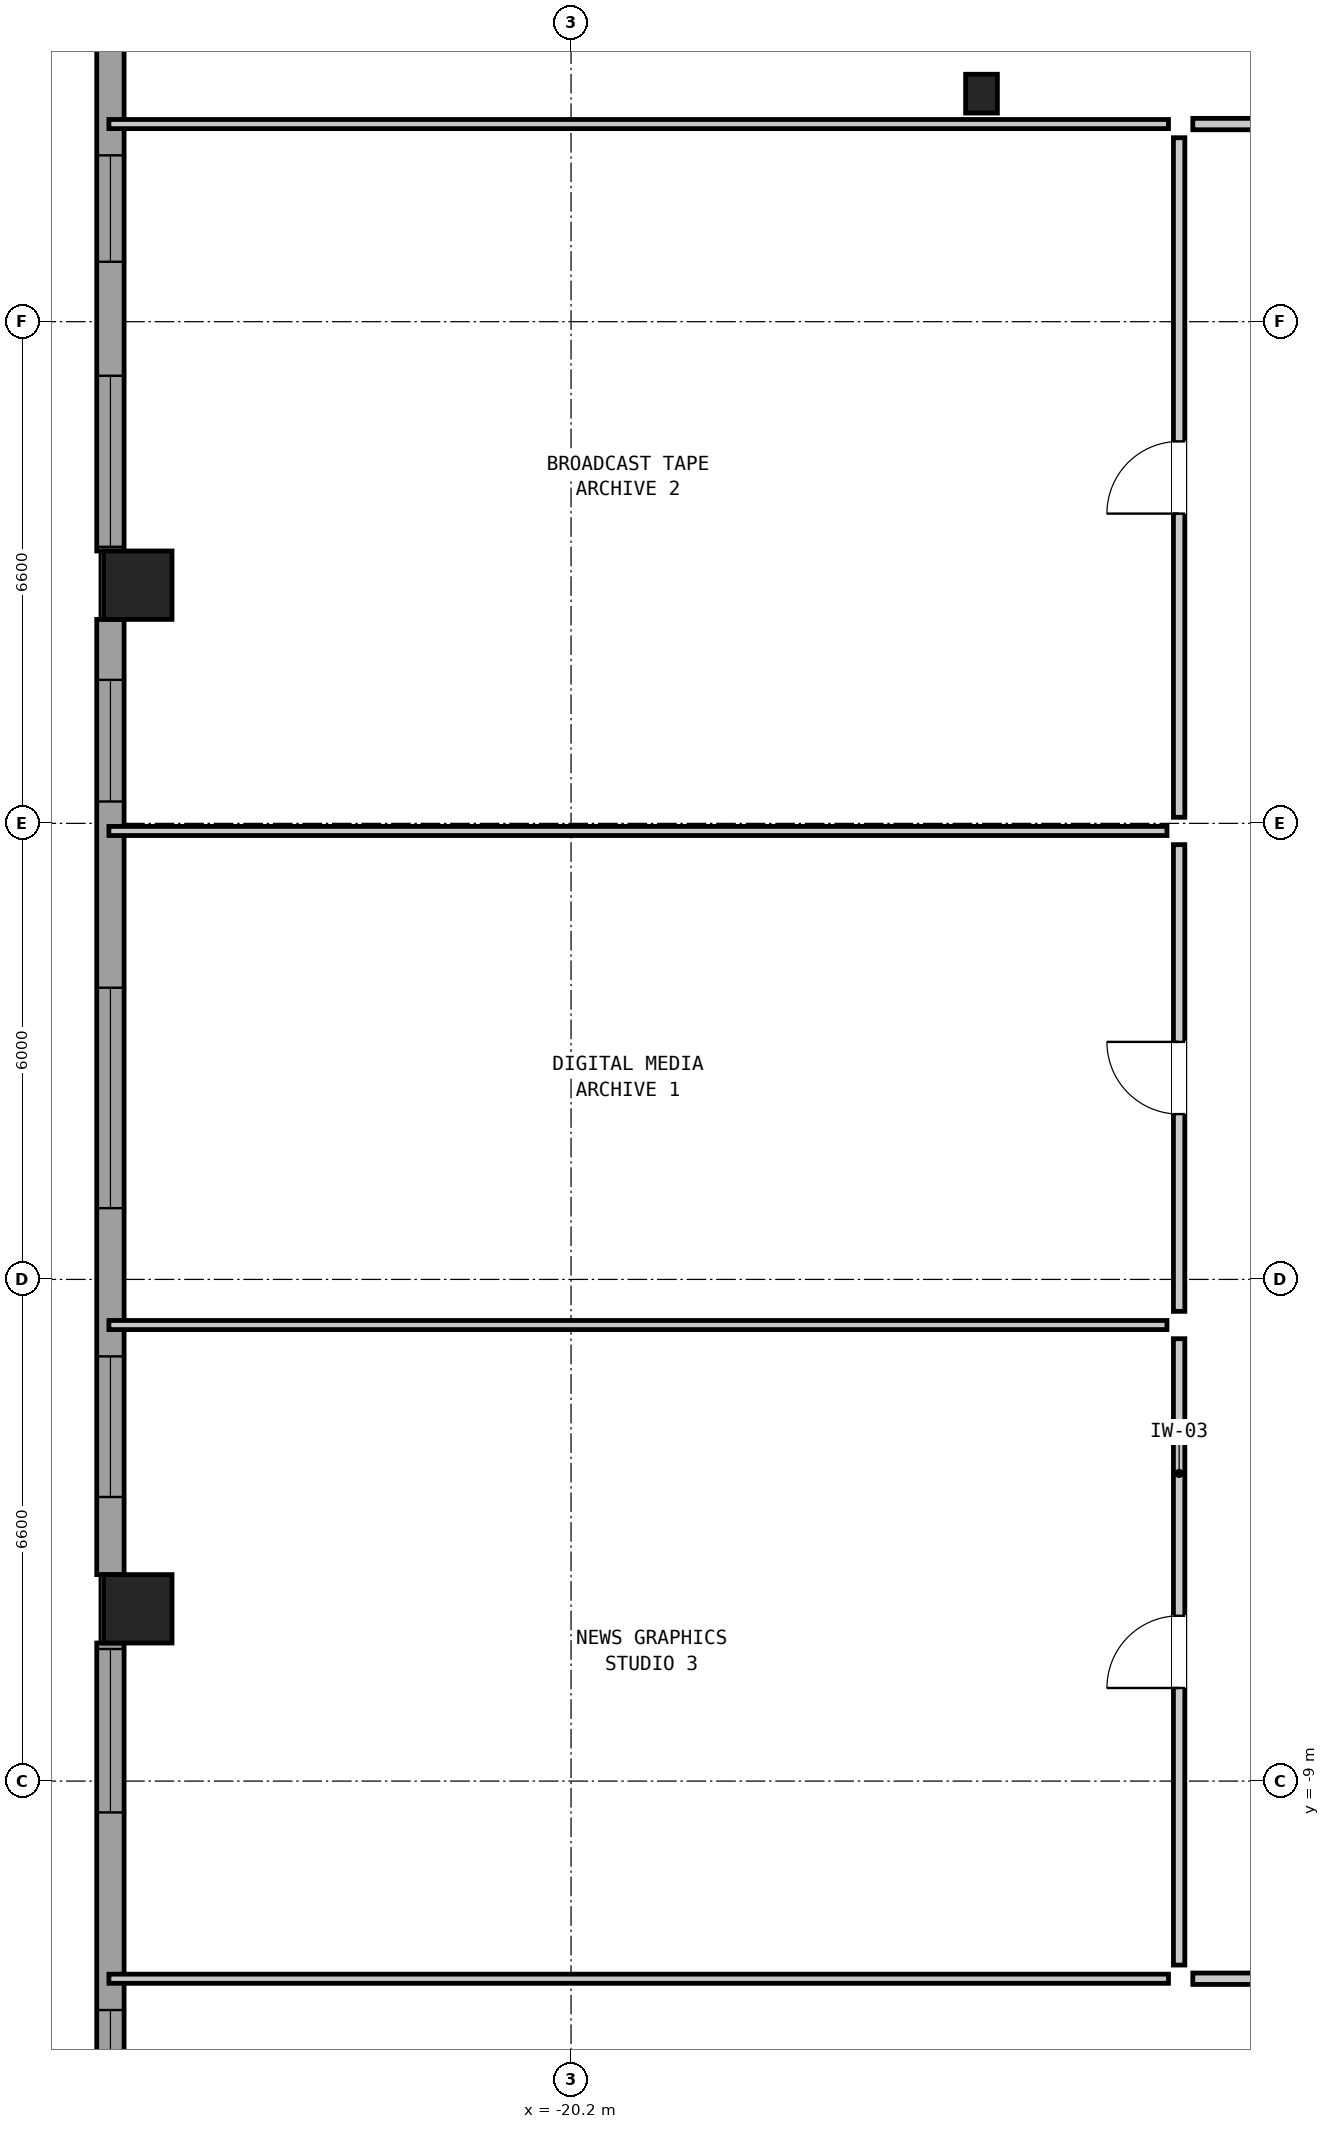
"""IFC4 building model, lengths in metres.
Left out: names, types, materials, properties, quantities, classifications, styles, units other than length and angle.
Written with IfcOpenShell. Run it as: python <this file> out.ifc"""

import sys

from ifc_helpers import new_model, si_unit, direction, frame, frame_2d, origin, origin_2d, place, context, subcontext, project, spatial, rectangle, hollow_rectangle, i_section, extrude, element, fill, save


model = new_model("IFC4")
c1 = context("Model", 3, precision=1e-05, world=origin(), true_north=direction((0.0, 1.0)))
c2 = subcontext(c1, "Body", "Model", "MODEL_VIEW")
j1 = project(units=[si_unit("LENGTHUNIT", "METRE"), si_unit("PLANEANGLEUNIT", "RADIAN")], contexts=[c1])
p1 = place(None, origin())
s1 = spatial("IfcSite", under=j1, at=p1, CompositionType="ELEMENT")
p2 = place(p1, origin())
s2 = spatial("IfcBuilding", under=s1, at=p2, CompositionType="ELEMENT")
p3 = place(p2, frame((0.0, 0.0, 47.45)))
s3 = spatial("IfcBuildingStorey", under=s2, at=p3, CompositionType="ELEMENT", Elevation=47.45)
for number, where, z_axis, x_axis in (
    (1, (-25.9, 6.733, 0.0), (0.0, 0.0, 1.0), (0.0, 1.0, 0.0)),
    (2, (-25.9, -6.733, 0.0), (0.0, 0.0, 1.0), (0.0, 1.0, 0.0)),
):
    element("IfcColumn", number, at=place(p3, frame(where, z_axis=z_axis, x_axis=x_axis)), inside=s3, PredefinedType="COLUMN", context=c2, shape_type="SweptSolid", body=[
        extrude(hollow_rectangle(XDim=0.9, YDim=0.9, WallThickness=0.055, at=origin_2d()), origin(), (0.0, 0.0, 1.0), 3.05),
    ])
p4 = place(p3, frame((-14.8, 13.2, 0.0), z_axis=(0.0, 0.0, 1.0), x_axis=(1.0, 0.0, 0.0)))
e3 = element("IfcColumn", 3, at=p4, inside=s3, PredefinedType="COLUMN", context=c2, shape_type="SweptSolid", body=[
    extrude(i_section(OverallWidth=0.418, OverallDepth=0.51, WebThickness=0.042, FlangeThickness=0.068, at=origin_2d()), origin(), (0.0, 0.0, 1.0), 3.05),
])
p5 = place(p3, frame((-26.26, -19.762, 0.0), z_axis=(0.0, 0.0, 1.0), x_axis=(0.0, 1.0, 0.0)))
e4 = element("IfcWall", 4, at=p5, inside=s3, PredefinedType="SOLIDWALL", context=c2, shape_type="SweptSolid", body=[
    extrude(rectangle(XDim=12.579, YDim=0.36, at=frame_2d((6.289, 0.0))), origin(), (0.0, 0.0, 1.0), 2.067),
])
p6 = place(p5, frame((1.8, 0.0, 0.2)))
e5 = element("IfcOpeningElement", 5, at=p6, cuts=e4, PredefinedType="OPENING", context=c2, shape_type="SweptSolid", body=[
    extrude(rectangle(XDim=2.65, YDim=1.05, at=frame_2d((1.325, 0.525))), frame((0.0, 0.192, 0.0), z_axis=(0.0, -1.0, 0.0), x_axis=(1.0, 0.0, 0.0)), (0.0, 0.0, 1.0), 0.384),
])
p7 = place(p5, frame((6.1, 0.0, 0.75)))
e6 = element("IfcOpeningElement", 6, at=p7, cuts=e4, PredefinedType="OPENING", context=c2, shape_type="SweptSolid", body=[
    extrude(rectangle(XDim=1.65, YDim=1.15, at=frame_2d((0.825, 0.575))), frame((0.0, 0.192, 0.0), z_axis=(0.0, -1.0, 0.0), x_axis=(1.0, 0.0, 0.0)), (0.0, 0.0, 1.0), 0.384),
])
p8 = place(p5, frame((10.35, 0.0, 0.2)))
e7 = element("IfcOpeningElement", 7, at=p8, cuts=e4, PredefinedType="OPENING", context=c2, shape_type="SweptSolid", body=[
    extrude(rectangle(XDim=2.15, YDim=1.2, at=frame_2d((1.075, 0.6))), frame((0.0, 0.192, 0.0), z_axis=(0.0, -1.0, 0.0), x_axis=(1.0, 0.0, 0.0)), (0.0, 0.0, 1.0), 0.384),
])
p9 = place(p3, frame((-26.26, -6.283, 0.0), z_axis=(0.0, 0.0, 1.0), x_axis=(0.0, 1.0, 0.0)))
e8 = element("IfcWall", 8, at=p9, inside=s3, PredefinedType="SOLIDWALL", context=c2, shape_type="SweptSolid", body=[
    extrude(rectangle(XDim=12.566, YDim=0.36, at=frame_2d((6.283, 0.0))), origin(), (0.0, 0.0, 1.0), 2.067),
])
p10 = place(p9, frame((1.021, 0.0, 0.7)))
e9 = element("IfcOpeningElement", 9, at=p10, cuts=e8, PredefinedType="OPENING", context=c2, shape_type="SweptSolid", body=[
    extrude(rectangle(XDim=1.85, YDim=1.2, at=frame_2d((0.925, 0.6))), frame((0.0, 0.192, 0.0), z_axis=(0.0, -1.0, 0.0), x_axis=(1.0, 0.0, 0.0)), (0.0, 0.0, 1.0), 0.384),
])
p11 = place(p9, frame((4.821, 0.0, 0.2)))
e10 = element("IfcOpeningElement", 10, at=p11, cuts=e8, PredefinedType="OPENING", context=c2, shape_type="SweptSolid", body=[
    extrude(rectangle(XDim=2.9, YDim=0.95, at=frame_2d((1.45, 0.475))), frame((0.0, 0.192, 0.0), z_axis=(0.0, -1.0, 0.0), x_axis=(1.0, 0.0, 0.0)), (0.0, 0.0, 1.0), 0.384),
])
p12 = place(p9, frame((10.171, 0.0, 0.85)))
e11 = element("IfcOpeningElement", 11, at=p12, cuts=e8, PredefinedType="OPENING", context=c2, shape_type="SweptSolid", body=[
    extrude(rectangle(XDim=1.6, YDim=1.05, at=frame_2d((0.8, 0.525))), frame((0.0, 0.192, 0.0), z_axis=(0.0, -1.0, 0.0), x_axis=(1.0, 0.0, 0.0)), (0.0, 0.0, 1.0), 0.384),
])
p13 = place(p3, frame((-26.26, 7.183, 0.0), z_axis=(0.0, 0.0, 1.0), x_axis=(0.0, 1.0, 0.0)))
e12 = element("IfcWall", 12, at=p13, inside=s3, PredefinedType="SOLIDWALL", context=c2, shape_type="SweptSolid", body=[
    extrude(rectangle(XDim=12.579, YDim=0.36, at=frame_2d((6.289, 0.0))), origin(), (0.0, 0.0, 1.0), 2.067),
])
p14 = place(p13, frame((0.055, 0.0, 0.2)))
e13 = element("IfcOpeningElement", 13, at=p14, cuts=e12, PredefinedType="OPENING", context=c2, shape_type="SweptSolid", body=[
    extrude(rectangle(XDim=2.25, YDim=1.15, at=frame_2d((1.125, 0.575))), frame((0.0, 0.192, 0.0), z_axis=(0.0, -1.0, 0.0), x_axis=(1.0, 0.0, 0.0)), (0.0, 0.0, 1.0), 0.384),
])
p15 = place(p13, frame((3.805, 0.0, 0.95)))
e14 = element("IfcOpeningElement", 14, at=p15, cuts=e12, PredefinedType="OPENING", context=c2, shape_type="SweptSolid", body=[
    extrude(rectangle(XDim=1.4, YDim=0.95, at=frame_2d((0.7, 0.475))), frame((0.0, 0.192, 0.0), z_axis=(0.0, -1.0, 0.0), x_axis=(1.0, 0.0, 0.0)), (0.0, 0.0, 1.0), 0.384),
])
p16 = place(p13, frame((8.055, 0.0, 0.2)))
e15 = element("IfcOpeningElement", 15, at=p16, cuts=e12, PredefinedType="OPENING", context=c2, shape_type="SweptSolid", body=[
    extrude(rectangle(XDim=2.8, YDim=1.0, at=frame_2d((1.4, 0.5))), frame((0.0, 0.192, 0.0), z_axis=(0.0, -1.0, 0.0), x_axis=(1.0, 0.0, 0.0)), (0.0, 0.0, 1.0), 0.384),
])
p17 = place(p3, frame((-26.28, 12.8, 0.0), z_axis=(0.0, 0.0, 1.0), x_axis=(1.0, 0.0, 0.0)))
e16 = element("IfcWall", 16, at=p17, inside=s3, PredefinedType="PARTITIONING", context=c2, shape_type="SweptSolid", body=[
    extrude(rectangle(XDim=13.94, YDim=0.12, at=frame_2d((6.97, 0.0))), origin(), (0.0, 0.0, 1.0), 2.83),
])
p18 = place(p3, frame((-26.28, -11.6, 0.0), z_axis=(0.0, 0.0, 1.0), x_axis=(1.0, 0.0, 0.0)))
e17 = element("IfcWall", 17, at=p18, inside=s3, PredefinedType="PARTITIONING", context=c2, shape_type="SweptSolid", body=[
    extrude(rectangle(XDim=13.94, YDim=0.12, at=frame_2d((6.97, 0.0))), origin(), (0.0, 0.0, 1.0), 2.274),
])
for number, where, z_axis, x_axis in (
    (18, (-26.28, -3.0, 0.0), (0.0, 0.0, 1.0), (1.0, 0.0, 0.0)),
    (19, (-26.28, 3.5, 0.0), (0.0, 0.0, 1.0), (1.0, 0.0, 0.0)),
):
    element("IfcWall", number, at=place(p3, frame(where, z_axis=z_axis, x_axis=x_axis)), inside=s3, PredefinedType="PARTITIONING", context=c2, shape_type="SweptSolid", body=[
        extrude(rectangle(XDim=13.92, YDim=0.12, at=frame_2d((6.96, 0.0))), origin(), (0.0, 0.0, 1.0), 1.799),
    ])
p19 = place(p3, frame((-12.02, 12.8, 0.0), z_axis=(0.0, 0.0, 1.0), x_axis=(1.0, 0.0, 0.0)))
e20 = element("IfcWall", 20, at=p19, inside=s3, PredefinedType="PARTITIONING", context=c2, shape_type="SweptSolid", body=[
    extrude(rectangle(XDim=5.34, YDim=0.15, at=frame_2d((2.67, 0.0))), origin(), (0.0, 0.0, 1.0), 2.83),
])
p20 = place(p19, frame((2.995, 0.0, 0.0)))
e21 = element("IfcOpeningElement", 21, at=p20, cuts=e20, PredefinedType="OPENING", context=c2, shape_type="SweptSolid", body=[
    extrude(rectangle(XDim=0.95, YDim=2.1, at=frame_2d((0.475, 1.05))), frame((0.0, 0.087, 0.0), z_axis=(0.0, -1.0, 0.0), x_axis=(1.0, 0.0, 0.0)), (0.0, 0.0, 1.0), 0.174),
])
p21 = place(p3, frame((-12.02, -11.6, 0.0), z_axis=(0.0, 0.0, 1.0), x_axis=(1.0, 0.0, 0.0)))
e22 = element("IfcWall", 22, at=p21, inside=s3, PredefinedType="PARTITIONING", context=c2, shape_type="SweptSolid", body=[
    extrude(rectangle(XDim=5.84, YDim=0.15, at=frame_2d((2.92, 0.0))), origin(), (0.0, 0.0, 1.0), 2.274),
])
p22 = place(p21, frame((3.045, 0.0, 0.0)))
e23 = element("IfcOpeningElement", 23, at=p22, cuts=e22, PredefinedType="OPENING", context=c2, shape_type="SweptSolid", body=[
    extrude(rectangle(XDim=0.95, YDim=2.1, at=frame_2d((0.475, 1.05))), frame((0.0, 0.087, 0.0), z_axis=(0.0, -1.0, 0.0), x_axis=(1.0, 0.0, 0.0)), (0.0, 0.0, 1.0), 0.174),
])
p23 = place(p3, frame((-12.2, -11.42, 0.0), z_axis=(0.0, 0.0, 1.0), x_axis=(0.0, 1.0, 0.0)))
e24 = element("IfcWall", 24, at=p23, inside=s3, PredefinedType="PARTITIONING", context=c2, shape_type="SweptSolid", body=[
    extrude(rectangle(XDim=8.24, YDim=0.15, at=frame_2d((4.12, 0.0))), origin(), (0.0, 0.0, 1.0), 2.83),
])
p24 = place(p23, frame((3.645, 0.0, 0.0)))
e25 = element("IfcOpeningElement", 25, at=p24, cuts=e24, PredefinedType="OPENING", context=c2, shape_type="SweptSolid", body=[
    extrude(rectangle(XDim=0.95, YDim=2.1, at=frame_2d((0.475, 1.05))), frame((0.0, 0.087, 0.0), z_axis=(0.0, -1.0, 0.0), x_axis=(1.0, 0.0, 0.0)), (0.0, 0.0, 1.0), 0.174),
])
p25 = place(p3, frame((-12.2, -2.82, 0.0), z_axis=(0.0, 0.0, 1.0), x_axis=(0.0, 1.0, 0.0)))
e26 = element("IfcWall", 26, at=p25, inside=s3, PredefinedType="PARTITIONING", context=c2, shape_type="SweptSolid", body=[
    extrude(rectangle(XDim=6.14, YDim=0.15, at=frame_2d((3.07, 0.0))), origin(), (0.0, 0.0, 1.0), 2.83),
])
p26 = place(p25, frame((2.595, 0.0, 0.0)))
e27 = element("IfcOpeningElement", 27, at=p26, cuts=e26, PredefinedType="OPENING", context=c2, shape_type="SweptSolid", body=[
    extrude(rectangle(XDim=0.95, YDim=2.1, at=frame_2d((0.475, 1.05))), frame((0.0, 0.087, 0.0), z_axis=(0.0, -1.0, 0.0), x_axis=(1.0, 0.0, 0.0)), (0.0, 0.0, 1.0), 0.174),
])
p27 = place(p3, frame((-12.2, 3.68, 0.0), z_axis=(0.0, 0.0, 1.0), x_axis=(0.0, 1.0, 0.0)))
e28 = element("IfcWall", 28, at=p27, inside=s3, PredefinedType="PARTITIONING", context=c2, shape_type="SweptSolid", body=[
    extrude(rectangle(XDim=8.94, YDim=0.15, at=frame_2d((4.47, 0.0))), origin(), (0.0, 0.0, 1.0), 2.83),
])
p28 = place(p27, frame((3.995, 0.0, 0.0)))
e29 = element("IfcOpeningElement", 29, at=p28, cuts=e28, PredefinedType="OPENING", context=c2, shape_type="SweptSolid", body=[
    extrude(rectangle(XDim=0.95, YDim=2.1, at=frame_2d((0.475, 1.05))), frame((0.0, 0.087, 0.0), z_axis=(0.0, -1.0, 0.0), x_axis=(1.0, 0.0, 0.0)), (0.0, 0.0, 1.0), 0.174),
])
p29 = place(p7, origin())
e30 = element("IfcWindow", 30, at=p29, inside=s3, PartitioningType="SINGLE_PANEL", PredefinedType="WINDOW", context=c2, shape_type="SweptSolid", body=[
    extrude(rectangle(XDim=1.65, YDim=1.15, at=frame_2d((0.825, 0.575))), frame((0.0, 0.03, 0.0), z_axis=(0.0, -1.0, 0.0), x_axis=(1.0, 0.0, 0.0)), (0.0, 0.0, 1.0), 0.06),
])
fill(e6, e30)
p30 = place(p8, origin())
e31 = element("IfcWindow", 31, at=p30, inside=s3, PartitioningType="SINGLE_PANEL", PredefinedType="WINDOW", context=c2, shape_type="SweptSolid", body=[
    extrude(rectangle(XDim=2.15, YDim=1.2, at=frame_2d((1.075, 0.6))), frame((0.0, 0.03, 0.0), z_axis=(0.0, -1.0, 0.0), x_axis=(1.0, 0.0, 0.0)), (0.0, 0.0, 1.0), 0.06),
])
fill(e7, e31)
p31 = place(p10, origin())
e32 = element("IfcWindow", 32, at=p31, inside=s3, PartitioningType="SINGLE_PANEL", PredefinedType="WINDOW", context=c2, shape_type="SweptSolid", body=[
    extrude(rectangle(XDim=1.85, YDim=1.2, at=frame_2d((0.925, 0.6))), frame((0.0, 0.03, 0.0), z_axis=(0.0, -1.0, 0.0), x_axis=(1.0, 0.0, 0.0)), (0.0, 0.0, 1.0), 0.06),
])
fill(e9, e32)
p32 = place(p11, origin())
e33 = element("IfcWindow", 33, at=p32, inside=s3, PartitioningType="SINGLE_PANEL", PredefinedType="WINDOW", context=c2, shape_type="SweptSolid", body=[
    extrude(rectangle(XDim=2.9, YDim=0.95, at=frame_2d((1.45, 0.475))), frame((0.0, 0.03, 0.0), z_axis=(0.0, -1.0, 0.0), x_axis=(1.0, 0.0, 0.0)), (0.0, 0.0, 1.0), 0.06),
])
fill(e10, e33)
p33 = place(p12, origin())
e34 = element("IfcWindow", 34, at=p33, inside=s3, PartitioningType="SINGLE_PANEL", PredefinedType="WINDOW", context=c2, shape_type="SweptSolid", body=[
    extrude(rectangle(XDim=1.6, YDim=1.05, at=frame_2d((0.8, 0.525))), frame((0.0, 0.03, 0.0), z_axis=(0.0, -1.0, 0.0), x_axis=(1.0, 0.0, 0.0)), (0.0, 0.0, 1.0), 0.06),
])
fill(e11, e34)
p34 = place(p14, origin())
e35 = element("IfcWindow", 35, at=p34, inside=s3, PartitioningType="SINGLE_PANEL", PredefinedType="WINDOW", context=c2, shape_type="SweptSolid", body=[
    extrude(rectangle(XDim=2.25, YDim=1.15, at=frame_2d((1.125, 0.575))), frame((0.0, 0.03, 0.0), z_axis=(0.0, -1.0, 0.0), x_axis=(1.0, 0.0, 0.0)), (0.0, 0.0, 1.0), 0.06),
])
fill(e13, e35)
p35 = place(p15, origin())
e36 = element("IfcWindow", 36, at=p35, inside=s3, PartitioningType="SINGLE_PANEL", PredefinedType="WINDOW", context=c2, shape_type="SweptSolid", body=[
    extrude(rectangle(XDim=1.4, YDim=0.95, at=frame_2d((0.7, 0.475))), frame((0.0, 0.03, 0.0), z_axis=(0.0, -1.0, 0.0), x_axis=(1.0, 0.0, 0.0)), (0.0, 0.0, 1.0), 0.06),
])
fill(e14, e36)
p36 = place(p24, origin())
e37 = element("IfcDoor", 37, at=p36, inside=s3, OperationType="SINGLE_SWING_LEFT", PredefinedType="DOOR", context=c2, shape_type="SweptSolid", body=[
    extrude(rectangle(XDim=0.95, YDim=2.1, at=frame_2d((0.475, 1.05))), frame((0.0, 0.025, 0.0), z_axis=(0.0, -1.0, 0.0), x_axis=(1.0, 0.0, 0.0)), (0.0, 0.0, 1.0), 0.05),
])
fill(e25, e37)
p37 = place(p26, origin())
e38 = element("IfcDoor", 38, at=p37, inside=s3, OperationType="SINGLE_SWING_RIGHT", PredefinedType="DOOR", context=c2, shape_type="SweptSolid", body=[
    extrude(rectangle(XDim=0.95, YDim=2.1, at=frame_2d((0.475, 1.05))), frame((0.0, 0.025, 0.0), z_axis=(0.0, -1.0, 0.0), x_axis=(1.0, 0.0, 0.0)), (0.0, 0.0, 1.0), 0.05),
])
fill(e27, e38)
p38 = place(p28, origin())
e39 = element("IfcDoor", 39, at=p38, inside=s3, OperationType="SINGLE_SWING_LEFT", PredefinedType="DOOR", context=c2, shape_type="SweptSolid", body=[
    extrude(rectangle(XDim=0.95, YDim=2.1, at=frame_2d((0.475, 1.05))), frame((0.0, 0.025, 0.0), z_axis=(0.0, -1.0, 0.0), x_axis=(1.0, 0.0, 0.0)), (0.0, 0.0, 1.0), 0.05),
])
fill(e29, e39)
save(model, sys.argv[1])
